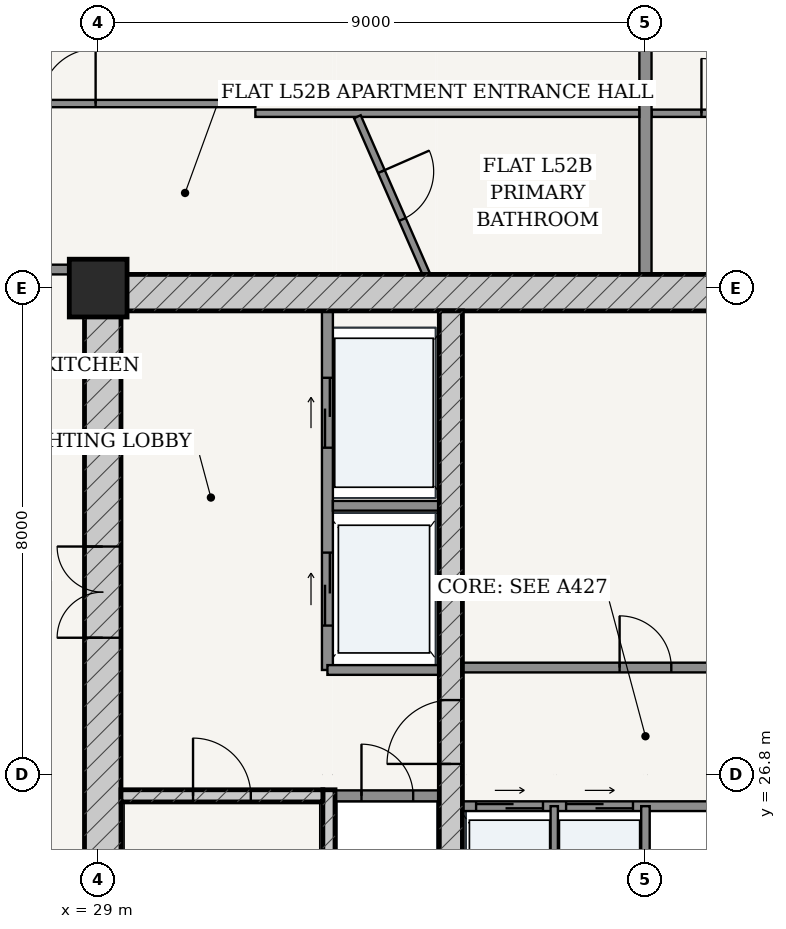
"""IFC4 building model, lengths in metres.
Left out: names, types, materials, properties, quantities, classifications, styles, units other than length and angle.
Written with IfcOpenShell. Run it as: python <this file> out.ifc"""

import sys

from ifc_helpers import new_model, si_unit, direction, frame, frame_2d, origin, origin_2d, place, context, subcontext, project, spatial, rectangle, extrude, source, transform, mapped, element, fill, save


model = new_model("IFC4")
c1 = context("Model", 3, precision=1e-05, world=origin(), true_north=direction((-0.2419218956, 0.970295726276)))
c2 = subcontext(c1, "Body", "Model", "MODEL_VIEW")
j1 = project(units=[si_unit("LENGTHUNIT", "METRE"), si_unit("PLANEANGLEUNIT", "RADIAN")], contexts=[c1])
p1 = place(None, origin())
s1 = spatial("IfcSite", under=j1, at=p1, CompositionType="ELEMENT")
p2 = place(p1, origin())
s2 = spatial("IfcBuilding", under=s1, at=p2, CompositionType="ELEMENT")
p3 = place(p2, frame((0.0, 0.0, 198.6)))
s3 = spatial("IfcBuildingStorey", under=s2, at=p3, CompositionType="ELEMENT", Elevation=198.6)
p4 = place(p3, frame((29.0, 34.8, 0.0), z_axis=(0.0, 0.0, 1.0), x_axis=(1.0, 0.0, 0.0)))
e1 = element("IfcColumn", 1, at=p4, inside=s3, PredefinedType="COLUMN", context=c2, shape_type="SweptSolid", body=[
    extrude(rectangle(XDim=0.95, YDim=0.95, at=origin_2d()), origin(), (0.0, 0.0, 1.0), 3.7),
])
p5 = place(p3, frame((28.775, 34.725, 0.0), z_axis=(0.0, 0.0, 1.0), x_axis=(1.0, 0.0, 0.0)))
e2 = element("IfcWall", 2, at=p5, inside=s3, PredefinedType="SHEAR", context=c2, shape_type="SweptSolid", body=[
    extrude(rectangle(XDim=18.45, YDim=0.6, at=frame_2d((9.225, 0.0))), origin(), (0.0, 0.0, 1.0), 3.435),
])
p6 = place(p3, frame((29.075, 19.175, 0.0), z_axis=(0.0, 0.0, 1.0), x_axis=(0.0, 1.0, 0.0)))
e3 = element("IfcWall", 3, at=p6, inside=s3, PredefinedType="SHEAR", context=c2, shape_type="SweptSolid", body=[
    extrude(rectangle(XDim=15.25, YDim=0.6, at=frame_2d((7.625, 0.0))), origin(), (0.0, 0.0, 1.0), 3.435),
])
p7 = place(p6, frame((9.875, 0.0, 0.0)))
e4 = element("IfcOpeningElement", 4, at=p7, cuts=e3, PredefinedType="OPENING", context=c2, shape_type="SweptSolid", body=[
    extrude(rectangle(XDim=1.5, YDim=2.2, at=frame_2d((0.75, 1.1))), frame((0.0, 0.31, 0.0), z_axis=(0.0, -1.0, 0.0), x_axis=(1.0, 0.0, 0.0)), (0.0, 0.0, 1.0), 0.62),
])
p8 = place(p3, frame((32.795, 19.175, 0.0), z_axis=(0.0, 0.0, 1.0), x_axis=(0.0, 1.0, 0.0)))
e5 = element("IfcWall", 5, at=p8, inside=s3, PredefinedType="SOLIDWALL", context=c2, shape_type="SweptSolid", body=[
    extrude(rectangle(XDim=7.375, YDim=0.2, at=frame_2d((3.688, 0.0))), origin(), (0.0, 0.0, 1.0), 3.435),
])
p9 = place(p3, frame((29.375, 26.45, 0.0), z_axis=(0.0, 0.0, 1.0), x_axis=(1.0, 0.0, 0.0)))
e6 = element("IfcWall", 6, at=p9, inside=s3, PredefinedType="SOLIDWALL", context=c2, shape_type="SweptSolid", body=[
    extrude(rectangle(XDim=3.32, YDim=0.2, at=frame_2d((1.66, 0.0))), origin(), (0.0, 0.0, 1.0), 3.435),
])
p10 = place(p9, frame((1.185, 0.0, 0.0)))
e7 = element("IfcOpeningElement", 7, at=p10, cuts=e6, PredefinedType="OPENING", context=c2, shape_type="SweptSolid", body=[
    extrude(rectangle(XDim=0.95, YDim=2.15, at=frame_2d((0.475, 1.075))), frame((0.0, 0.11, 0.0), z_axis=(0.0, -1.0, 0.0), x_axis=(1.0, 0.0, 0.0)), (0.0, 0.0, 1.0), 0.22),
])
p11 = place(p3, frame((34.8, 19.175, 0.0), z_axis=(0.0, 0.0, 1.0), x_axis=(0.0, 1.0, 0.0)))
e8 = element("IfcWall", 8, at=p11, inside=s3, PredefinedType="SHEAR", context=c2, shape_type="SweptSolid", body=[
    extrude(rectangle(XDim=15.25, YDim=0.38, at=frame_2d((7.625, 0.0))), origin(), (0.0, 0.0, 1.0), 3.435),
])
p12 = place(p11, frame((7.8, 0.0, 0.0)))
e9 = element("IfcOpeningElement", 9, at=p12, cuts=e8, PredefinedType="OPENING", context=c2, shape_type="SweptSolid", body=[
    extrude(rectangle(XDim=1.05, YDim=2.15, at=frame_2d((0.525, 1.075))), frame((0.0, 0.2, 0.0), z_axis=(0.0, -1.0, 0.0), x_axis=(1.0, 0.0, 0.0)), (0.0, 0.0, 1.0), 0.4),
])
p13 = place(p3, frame((32.9, 26.45, 0.0), z_axis=(0.0, 0.0, 1.0), x_axis=(1.0, 0.0, 0.0)))
e10 = element("IfcWall", 10, at=p13, inside=s3, PredefinedType="PARTITIONING", context=c2, shape_type="SweptSolid", body=[
    extrude(rectangle(XDim=1.71, YDim=0.18, at=frame_2d((0.855, 0.0))), origin(), (0.0, 0.0, 1.0), 3.435),
])
p14 = place(p13, frame((0.43, 0.0, 0.0)))
e11 = element("IfcOpeningElement", 11, at=p14, cuts=e10, PredefinedType="OPENING", context=c2, shape_type="SweptSolid", body=[
    extrude(rectangle(XDim=0.85, YDim=2.1, at=frame_2d((0.425, 1.05))), frame((0.0, 0.1, 0.0), z_axis=(0.0, -1.0, 0.0), x_axis=(1.0, 0.0, 0.0)), (0.0, 0.0, 1.0), 0.2),
])
p15 = place(p3, frame((32.77, 28.52, 0.0), z_axis=(0.0, 0.0, 1.0), x_axis=(0.0, 1.0, 0.0)))
e12 = element("IfcWall", 12, at=p15, inside=s3, PredefinedType="PARTITIONING", context=c2, shape_type="SweptSolid", body=[
    extrude(rectangle(XDim=5.905, YDim=0.18, at=frame_2d((2.953, 0.0))), origin(), (0.0, 0.0, 1.0), 3.435),
])
p16 = place(p15, frame((3.655, 0.0, 0.0)))
e13 = element("IfcOpeningElement", 13, at=p16, cuts=e12, PredefinedType="OPENING", context=c2, shape_type="SweptSolid", body=[
    extrude(rectangle(XDim=1.15, YDim=2.2, at=frame_2d((0.575, 1.1))), frame((0.0, 0.1, 0.0), z_axis=(0.0, -1.0, 0.0), x_axis=(1.0, 0.0, 0.0)), (0.0, 0.0, 1.0), 0.2),
])
p17 = place(p15, frame((0.73, 0.0, 0.0)))
e14 = element("IfcOpeningElement", 14, at=p17, cuts=e12, PredefinedType="OPENING", context=c2, shape_type="SweptSolid", body=[
    extrude(rectangle(XDim=1.2, YDim=2.25, at=frame_2d((0.6, 1.125))), frame((0.0, 0.1, 0.0), z_axis=(0.0, -1.0, 0.0), x_axis=(1.0, 0.0, 0.0)), (0.0, 0.0, 1.0), 0.2),
])
p18 = place(p3, frame((32.86, 31.22, 0.0), z_axis=(0.0, 0.0, 1.0), x_axis=(1.0, 0.0, 0.0)))
e15 = element("IfcWall", 15, at=p18, inside=s3, PredefinedType="PARTITIONING", context=c2, shape_type="SweptSolid", body=[
    extrude(rectangle(XDim=1.75, YDim=0.16, at=frame_2d((0.875, 0.0))), origin(), (0.0, 0.0, 1.0), 3.435),
])
p19 = place(p3, frame((32.77, 28.52, 0.0), z_axis=(0.0, 0.0, 1.0), x_axis=(1.0, 0.0, 0.0)))
e16 = element("IfcWall", 16, at=p19, inside=s3, PredefinedType="PARTITIONING", context=c2, shape_type="SweptSolid", body=[
    extrude(rectangle(XDim=1.84, YDim=0.16, at=frame_2d((0.92, 0.0))), origin(), (0.0, 0.0, 1.0), 3.435),
])
p20 = place(p3, frame((34.99, 28.56, 0.0), z_axis=(0.0, 0.0, 1.0), x_axis=(1.0, 0.0, 0.0)))
e17 = element("IfcWall", 17, at=p20, inside=s3, PredefinedType="PARTITIONING", context=c2, shape_type="SweptSolid", body=[
    extrude(rectangle(XDim=6.02, YDim=0.16, at=frame_2d((3.01, 0.0))), origin(), (0.0, 0.0, 1.0), 3.435),
])
p21 = place(p20, frame((2.585, 0.0, 0.0)))
e18 = element("IfcOpeningElement", 18, at=p21, cuts=e17, PredefinedType="OPENING", context=c2, shape_type="SweptSolid", body=[
    extrude(rectangle(XDim=0.85, YDim=2.1, at=frame_2d((0.425, 1.05))), frame((0.0, 0.09, 0.0), z_axis=(0.0, -1.0, 0.0), x_axis=(1.0, 0.0, 0.0)), (0.0, 0.0, 1.0), 0.18),
])
p22 = place(p3, frame((34.99, 26.28, 0.0), z_axis=(0.0, 0.0, 1.0), x_axis=(1.0, 0.0, 0.0)))
e19 = element("IfcWall", 19, at=p22, inside=s3, PredefinedType="PARTITIONING", context=c2, shape_type="SweptSolid", body=[
    extrude(rectangle(XDim=6.02, YDim=0.16, at=frame_2d((3.01, 0.0))), origin(), (0.0, 0.0, 1.0), 3.435),
])
p23 = place(p22, frame((0.225, 0.0, 0.0)))
e20 = element("IfcOpeningElement", 20, at=p23, cuts=e19, PredefinedType="OPENING", context=c2, shape_type="SweptSolid", body=[
    extrude(rectangle(XDim=1.1, YDim=2.2, at=frame_2d((0.55, 1.1))), frame((0.0, 0.09, 0.0), z_axis=(0.0, -1.0, 0.0), x_axis=(1.0, 0.0, 0.0)), (0.0, 0.0, 1.0), 0.18),
])
p24 = place(p22, frame((1.705, 0.0, 0.0)))
e21 = element("IfcOpeningElement", 21, at=p24, cuts=e19, PredefinedType="OPENING", context=c2, shape_type="SweptSolid", body=[
    extrude(rectangle(XDim=1.1, YDim=2.2, at=frame_2d((0.55, 1.1))), frame((0.0, 0.09, 0.0), z_axis=(0.0, -1.0, 0.0), x_axis=(1.0, 0.0, 0.0)), (0.0, 0.0, 1.0), 0.18),
])
p25 = place(p3, frame((36.5, 23.72, 0.0), z_axis=(0.0, 0.0, 1.0), x_axis=(0.0, 1.0, 0.0)))
e22 = element("IfcWall", 22, at=p25, inside=s3, PredefinedType="PARTITIONING", context=c2, shape_type="SweptSolid", body=[
    extrude(rectangle(XDim=2.56, YDim=0.12, at=frame_2d((1.28, 0.0))), origin(), (0.0, 0.0, 1.0), 3.435),
])
p26 = place(p3, frame((38.0, 23.72, 0.0), z_axis=(0.0, 0.0, 1.0), x_axis=(0.0, 1.0, 0.0)))
e23 = element("IfcWall", 23, at=p26, inside=s3, PredefinedType="PARTITIONING", context=c2, shape_type="SweptSolid", body=[
    extrude(rectangle(XDim=2.56, YDim=0.14, at=frame_2d((1.28, 0.0))), origin(), (0.0, 0.0, 1.0), 3.435),
])
p27 = place(p3, frame((26.845, 35.105, 0.0), z_axis=(0.0, 0.0, 1.0), x_axis=(1.0, 0.0, 0.0)))
e24 = element("IfcWall", 24, at=p27, inside=s3, PredefinedType="PARTITIONING", context=c2, shape_type="SweptSolid", body=[
    extrude(rectangle(XDim=1.93, YDim=0.16, at=frame_2d((0.965, 0.0))), origin(), (0.0, 0.0, 1.0), 3.435),
])
p28 = place(p27, frame((0.37, 0.0, 0.0)))
e25 = element("IfcOpeningElement", 25, at=p28, cuts=e24, PredefinedType="OPENING", context=c2, shape_type="SweptSolid", body=[
    extrude(rectangle(XDim=0.98, YDim=2.2, at=frame_2d((0.49, 1.1))), frame((0.0, 0.09, 0.0), z_axis=(0.0, -1.0, 0.0), x_axis=(1.0, 0.0, 0.0)), (0.0, 0.0, 1.0), 0.18),
])
p29 = place(p3, frame((38.102, 37.675, 0.0), z_axis=(0.0, 0.0, 1.0), x_axis=(1.0, 0.0, 0.0)))
e26 = element("IfcWall", 26, at=p29, inside=s3, PredefinedType="PARTITIONING", context=c2, shape_type="SweptSolid", body=[
    extrude(rectangle(XDim=6.313, YDim=0.12, at=frame_2d((3.156, 0.0))), origin(), (0.0, 0.0, 1.0), 2.951),
])
p30 = place(p29, frame((0.819, 0.0, 0.0)))
e27 = element("IfcOpeningElement", 27, at=p30, cuts=e26, PredefinedType="OPENING", context=c2, shape_type="SweptSolid", body=[
    extrude(rectangle(XDim=0.9, YDim=2.15, at=frame_2d((0.45, 1.075))), frame((0.0, 0.07, 0.0), z_axis=(0.0, -1.0, 0.0), x_axis=(1.0, 0.0, 0.0)), (0.0, 0.0, 1.0), 0.14),
])
p31 = place(p3, frame((38.0, 35.027, 0.0), z_axis=(0.0, 0.0, 1.0), x_axis=(0.0, 1.0, 0.0)))
e28 = element("IfcWall", 28, at=p31, inside=s3, PredefinedType="PARTITIONING", context=c2, shape_type="SweptSolid", body=[
    extrude(rectangle(XDim=11.413, YDim=0.2, at=frame_2d((5.707, 0.0))), origin(), (0.0, 0.0, 1.0), 2.52),
])
p32 = place(p3, frame((24.115, 37.835, 0.0), z_axis=(0.0, 0.0, 1.0), x_axis=(1.0, 0.0, 0.0)))
e29 = element("IfcWall", 29, at=p32, inside=s3, PredefinedType="PARTITIONING", context=c2, shape_type="SweptSolid", body=[
    extrude(rectangle(XDim=7.47, YDim=0.12, at=frame_2d((3.735, 0.0))), origin(), (0.0, 0.0, 1.0), 2.951),
])
p33 = place(p32, frame((3.943, 0.0, 0.0)))
e30 = element("IfcOpeningElement", 30, at=p33, cuts=e29, PredefinedType="OPENING", context=c2, shape_type="SweptSolid", body=[
    extrude(rectangle(XDim=0.9, YDim=2.15, at=frame_2d((0.45, 1.075))), frame((0.0, 0.07, 0.0), z_axis=(0.0, -1.0, 0.0), x_axis=(1.0, 0.0, 0.0)), (0.0, 0.0, 1.0), 0.14),
])
p34 = place(p3, frame((31.585, 37.675, 0.0), z_axis=(0.0, 0.0, 1.0), x_axis=(1.0, 0.0, 0.0)))
e31 = element("IfcWall", 31, at=p34, inside=s3, PredefinedType="PARTITIONING", context=c2, shape_type="SweptSolid", body=[
    extrude(rectangle(XDim=6.313, YDim=0.12, at=frame_2d((3.156, 0.0))), origin(), (0.0, 0.0, 1.0), 2.951),
])
p35 = place(p3, frame((34.397, 35.027, 0.0), z_axis=(0.0, 0.0, 1.0), x_axis=(-0.401135725485, 0.916018629581, 0.0)))
e32 = element("IfcWall", 32, at=p35, inside=s3, PredefinedType="PARTITIONING", context=c2, shape_type="SweptSolid", body=[
    extrude(rectangle(XDim=2.829, YDim=0.12, at=frame_2d((1.415, 0.0))), origin(), (0.0, 0.0, 1.0), 3.435),
])
p36 = place(p35, frame((0.985, 0.0, 0.0)))
e33 = element("IfcOpeningElement", 33, at=p36, cuts=e32, PredefinedType="OPENING", context=c2, shape_type="SweptSolid", body=[
    extrude(rectangle(XDim=0.86, YDim=2.15, at=frame_2d((0.43, 1.075))), frame((0.0, 0.07, 0.0), z_axis=(0.0, -1.0, 0.0), x_axis=(1.0, 0.0, 0.0)), (0.0, 0.0, 1.0), 0.14),
])
m1 = source(origin(), c2, "Body", "SweptSolid", [
    extrude(rectangle(XDim=1.5, YDim=2.2, at=frame_2d((0.75, 1.1))), frame((0.0, 0.025, 0.0), z_axis=(0.0, -1.0, 0.0), x_axis=(1.0, 0.0, 0.0)), (0.0, 0.0, 1.0), 0.05),
])
p37 = place(p7, origin())
e34 = element("IfcDoor", 34, at=p37, inside=s3, OperationType="DOUBLE_DOOR_SINGLE_SWING", PredefinedType="DOOR", context=c2, shape_type="MappedRepresentation", body=[
    mapped(m1, transform((0.0, 0.0, 0.0), scale=1.0)),
])
fill(e4, e34)
m2 = source(origin(), c2, "Body", "SweptSolid", [
    extrude(rectangle(XDim=1.05, YDim=2.15, at=frame_2d((0.525, 1.075))), frame((0.0, 0.025, 0.0), z_axis=(0.0, -1.0, 0.0), x_axis=(1.0, 0.0, 0.0)), (0.0, 0.0, 1.0), 0.05),
])
p38 = place(p12, origin())
e35 = element("IfcDoor", 35, at=p38, inside=s3, OperationType="SINGLE_SWING_LEFT", PredefinedType="DOOR", context=c2, shape_type="MappedRepresentation", body=[
    mapped(m2, transform((0.0, 0.0, 0.0), scale=1.0)),
])
fill(e9, e35)
m3 = source(origin(), c2, "Body", "SweptSolid", [
    extrude(rectangle(XDim=0.95, YDim=2.15, at=frame_2d((0.475, 1.075))), frame((0.0, 0.025, 0.0), z_axis=(0.0, -1.0, 0.0), x_axis=(1.0, 0.0, 0.0)), (0.0, 0.0, 1.0), 0.05),
])
p39 = place(p10, origin())
e36 = element("IfcDoor", 36, at=p39, inside=s3, OperationType="SINGLE_SWING_LEFT", PredefinedType="DOOR", context=c2, shape_type="MappedRepresentation", body=[
    mapped(m3, transform((0.0, 0.0, 0.0), scale=1.0)),
])
fill(e7, e36)
m4 = source(origin(), c2, "Body", "SweptSolid", [
    extrude(rectangle(XDim=0.85, YDim=2.1, at=frame_2d((0.425, 1.05))), frame((0.0, 0.025, 0.0), z_axis=(0.0, -1.0, 0.0), x_axis=(1.0, 0.0, 0.0)), (0.0, 0.0, 1.0), 0.05),
])
p40 = place(p14, origin())
e37 = element("IfcDoor", 37, at=p40, inside=s3, OperationType="SINGLE_SWING_LEFT", PredefinedType="DOOR", context=c2, shape_type="MappedRepresentation", body=[
    mapped(m4, transform((0.0, 0.0, 0.0), scale=1.0)),
])
fill(e11, e37)
p41 = place(p21, origin())
e38 = element("IfcDoor", 38, at=p41, inside=s3, OperationType="SINGLE_SWING_LEFT", PredefinedType="DOOR", context=c2, shape_type="MappedRepresentation", body=[
    mapped(m4, transform((0.0, 0.0, 0.0), scale=1.0)),
])
fill(e18, e38)
m5 = source(origin(), c2, "Body", "SweptSolid", [
    extrude(rectangle(XDim=1.15, YDim=2.2, at=frame_2d((0.575, 1.1))), frame((0.0, 0.025, 0.0), z_axis=(0.0, -1.0, 0.0), x_axis=(1.0, 0.0, 0.0)), (0.0, 0.0, 1.0), 0.05),
])
p42 = place(p16, origin())
e39 = element("IfcDoor", 39, at=p42, inside=s3, OperationType="DOUBLE_DOOR_SLIDING", PredefinedType="DOOR", context=c2, shape_type="MappedRepresentation", body=[
    mapped(m5, transform((0.0, 0.0, 0.0), scale=1.0)),
])
fill(e13, e39)
m6 = source(origin(), c2, "Body", "SweptSolid", [
    extrude(rectangle(XDim=1.2, YDim=2.25, at=frame_2d((0.6, 1.125))), frame((0.0, 0.025, 0.0), z_axis=(0.0, -1.0, 0.0), x_axis=(1.0, 0.0, 0.0)), (0.0, 0.0, 1.0), 0.05),
])
p43 = place(p17, origin())
e40 = element("IfcDoor", 40, at=p43, inside=s3, OperationType="DOUBLE_DOOR_SLIDING", PredefinedType="DOOR", context=c2, shape_type="MappedRepresentation", body=[
    mapped(m6, transform((0.0, 0.0, 0.0), scale=1.0)),
])
fill(e14, e40)
m7 = source(origin(), c2, "Body", "SweptSolid", [
    extrude(rectangle(XDim=1.1, YDim=2.2, at=frame_2d((0.55, 1.1))), frame((0.0, 0.025, 0.0), z_axis=(0.0, -1.0, 0.0), x_axis=(1.0, 0.0, 0.0)), (0.0, 0.0, 1.0), 0.05),
])
p44 = place(p23, origin())
e41 = element("IfcDoor", 41, at=p44, inside=s3, OperationType="DOUBLE_DOOR_SLIDING", PredefinedType="DOOR", context=c2, shape_type="MappedRepresentation", body=[
    mapped(m7, transform((0.0, 0.0, 0.0), scale=1.0)),
])
fill(e20, e41)
p45 = place(p24, origin())
e42 = element("IfcDoor", 42, at=p45, inside=s3, OperationType="DOUBLE_DOOR_SLIDING", PredefinedType="DOOR", context=c2, shape_type="MappedRepresentation", body=[
    mapped(m7, transform((0.0, 0.0, 0.0), scale=1.0)),
])
fill(e21, e42)
m8 = source(origin(), c2, "Body", "SweptSolid", [
    extrude(rectangle(XDim=0.9, YDim=2.15, at=frame_2d((0.45, 1.075))), frame((0.0, 0.025, 0.0), z_axis=(0.0, -1.0, 0.0), x_axis=(1.0, 0.0, 0.0)), (0.0, 0.0, 1.0), 0.05),
])
p46 = place(p30, origin())
e43 = element("IfcDoor", 43, at=p46, inside=s3, OperationType="SINGLE_SWING_LEFT", PredefinedType="DOOR", context=c2, shape_type="MappedRepresentation", body=[
    mapped(m8, transform((0.0, 0.0, 0.0), scale=1.0)),
])
fill(e27, e43)
m9 = source(origin(), c2, "Body", "SweptSolid", [
    extrude(rectangle(XDim=0.86, YDim=2.15, at=frame_2d((0.43, 1.075))), frame((0.0, 0.025, 0.0), z_axis=(0.0, -1.0, 0.0), x_axis=(1.0, 0.0, 0.0)), (0.0, 0.0, 1.0), 0.05),
])
p47 = place(p36, frame((0.86, 0.0, 0.0), z_axis=(0.0, 0.0, 1.0), x_axis=(-1.0, 0.0, 0.0)))
e44 = element("IfcDoor", 44, at=p47, inside=s3, OperationType="SINGLE_SWING_LEFT", PredefinedType="DOOR", context=c2, shape_type="MappedRepresentation", body=[
    mapped(m9, transform((0.0, 0.0, 0.0), scale=1.0)),
])
fill(e33, e44)
p48 = place(p33, origin())
e45 = element("IfcDoor", 45, at=p48, inside=s3, OperationType="SINGLE_SWING_RIGHT", PredefinedType="DOOR", context=c2, shape_type="MappedRepresentation", body=[
    mapped(m8, transform((0.0, 0.0, 0.0), scale=1.0)),
])
fill(e30, e45)
save(model, sys.argv[1])
